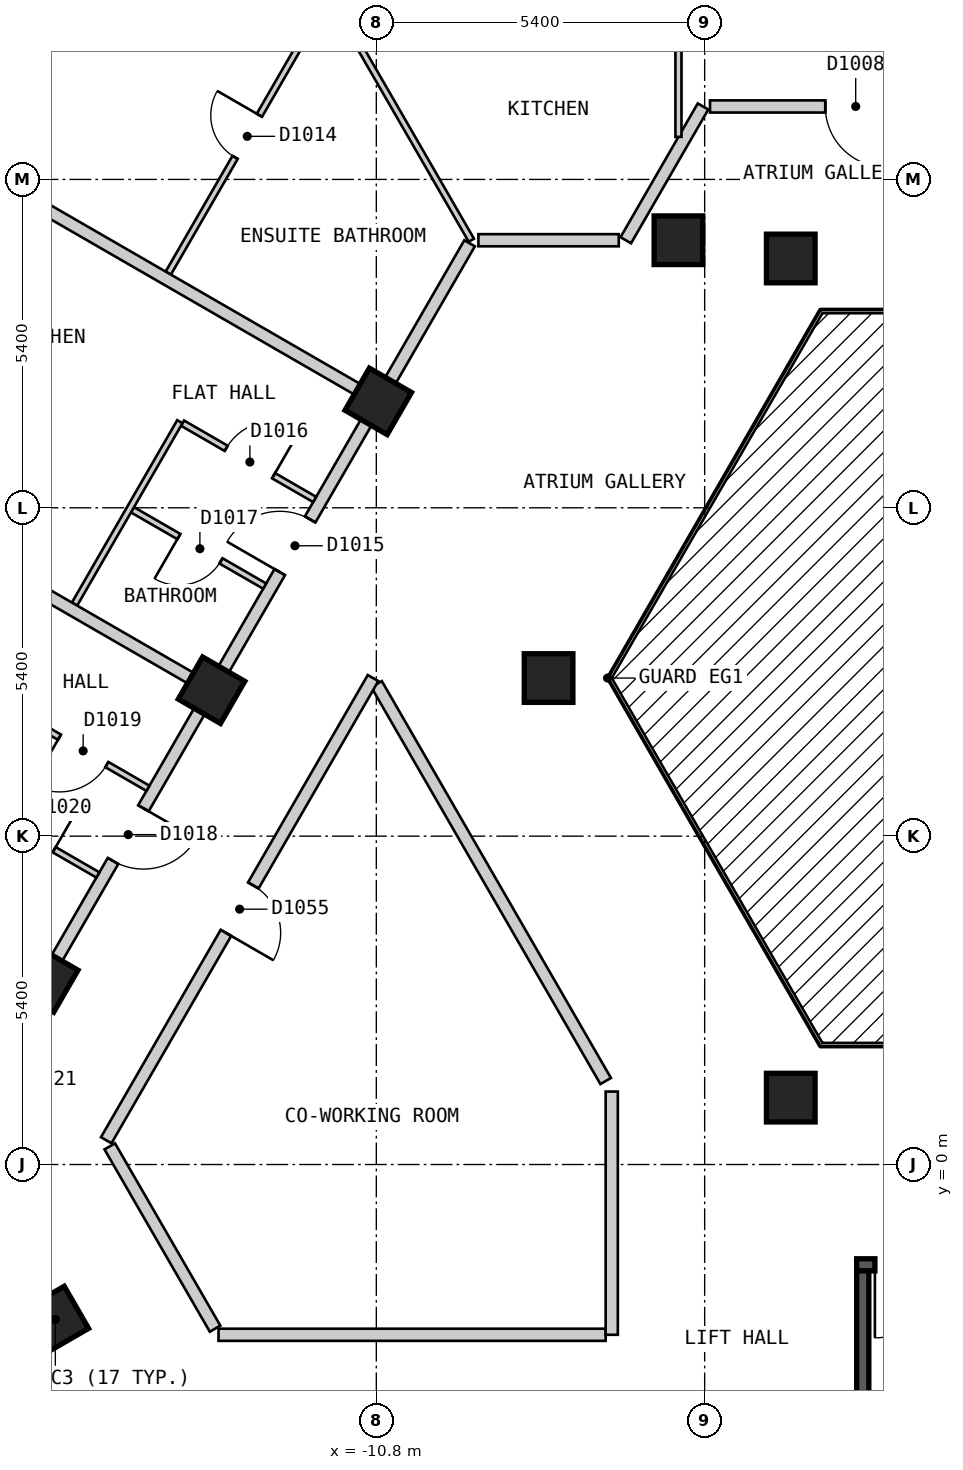
"""IFC4 building model, lengths in metres.
Left out: names, types, materials, properties, quantities, classifications, styles, units other than length and angle.
Written with IfcOpenShell. Run it as: python <this file> out.ifc"""

import sys

from ifc_helpers import new_model, si_unit, direction, frame, frame_2d, origin, origin_2d, place, context, subcontext, project, spatial, polyline, rectangle, outline, extrude, element, fill, save


model = new_model("IFC4")
c1 = context("Model", 3, precision=1e-05, world=origin(), true_north=direction((0.0, 1.0)))
c2 = subcontext(c1, "Body", "Model", "MODEL_VIEW")
j1 = project(units=[si_unit("LENGTHUNIT", "METRE"), si_unit("PLANEANGLEUNIT", "RADIAN")], contexts=[c1])
p1 = place(None, origin())
s1 = spatial("IfcSite", under=j1, at=p1, CompositionType="ELEMENT")
p2 = place(p1, origin())
s2 = spatial("IfcBuilding", under=s1, at=p2, CompositionType="ELEMENT")
p3 = place(p2, frame((0.0, 0.0, 120.6)))
s3 = spatial("IfcBuildingStorey", under=s2, at=p3, CompositionType="ELEMENT", Elevation=120.6)
for number, where, z_axis, x_axis in (
    (1, (-16.079, -2.549, 0.0), (0.0, 0.0, 1.0), (0.5, -0.866, 0.0)),
    (2, (-3.984, 14.9, 0.0), (0.0, 0.0, 1.0), (1.0, 0.0, 0.0)),
    (3, (-5.831, 15.2, 0.0), (0.0, 0.0, 1.0), (-1.0, 0.0, 0.0)),
    (4, (-10.768, 12.55, 0.0), (0.0, 0.0, 1.0), (-0.5, -0.866, 0.0)),
    (5, (-7.967, 8.0, 0.0), (0.0, 0.0, 1.0), (1.0, 0.0, 0.0)),
    (6, (-13.51, 7.8, 0.0), (0.0, 0.0, 1.0), (-0.5, -0.866, 0.0)),
    (7, (-3.984, 1.1, 0.0), (0.0, 0.0, 1.0), (1.0, 0.0, 0.0)),
    (8, (-16.253, 3.05, 0.0), (0.0, 0.0, 1.0), (-0.5, -0.866, 0.0)),
):
    element("IfcColumn", number, at=place(p3, frame(where, z_axis=z_axis, x_axis=x_axis)), inside=s3, PredefinedType="COLUMN", context=c2, shape_type="SweptSolid", body=[
        extrude(rectangle(XDim=0.8, YDim=0.8, at=origin_2d()), origin(), (0.0, 0.0, 1.0), 3.0),
    ])
p4 = place(p3, frame((-28.218, -2.025, 0.0), z_axis=(0.0, 0.0, 1.0), x_axis=(0.500017503135, -0.866015298109, 0.0)))
e9 = element("IfcWall", 9, at=p4, inside=s3, PredefinedType="SOLIDWALL", context=c2, shape_type="SweptSolid", body=[
    extrude(outline(polyline([(0.0, -0.15), (24.711, -0.15), (24.631, 0.15), (0.08, 0.15), (0.0, -0.15)])), origin(), (0.0, 0.0, 1.0), 2.7),
])
p5 = place(p4, frame((1.4, 0.0, 0.15)))
e10 = element("IfcOpeningElement", 10, at=p5, cuts=e9, PredefinedType="OPENING", context=c2, shape_type="SweptSolid", body=[
    extrude(rectangle(XDim=1.5, YDim=2.1, at=frame_2d((0.75, 1.05))), frame((0.0, 0.16, 0.0), z_axis=(0.0, -1.0, 0.0), x_axis=(1.0, 0.0, 0.0)), (0.0, 0.0, 1.0), 0.32),
])
p6 = place(p4, frame((4.316, 0.0, 0.15)))
e11 = element("IfcOpeningElement", 11, at=p6, cuts=e9, PredefinedType="OPENING", context=c2, shape_type="SweptSolid", body=[
    extrude(rectangle(XDim=1.5, YDim=2.1, at=frame_2d((0.75, 1.05))), frame((0.0, 0.16, 0.0), z_axis=(0.0, -1.0, 0.0), x_axis=(1.0, 0.0, 0.0)), (0.0, 0.0, 1.0), 0.32),
])
p7 = place(p4, frame((7.231, 0.0, 0.15)))
e12 = element("IfcOpeningElement", 12, at=p7, cuts=e9, PredefinedType="OPENING", context=c2, shape_type="SweptSolid", body=[
    extrude(rectangle(XDim=1.5, YDim=2.1, at=frame_2d((0.75, 1.05))), frame((0.0, 0.16, 0.0), z_axis=(0.0, -1.0, 0.0), x_axis=(1.0, 0.0, 0.0)), (0.0, 0.0, 1.0), 0.32),
])
p8 = place(p4, frame((10.147, 0.0, 0.15)))
e13 = element("IfcOpeningElement", 13, at=p8, cuts=e9, PredefinedType="OPENING", context=c2, shape_type="SweptSolid", body=[
    extrude(rectangle(XDim=1.5, YDim=2.1, at=frame_2d((0.75, 1.05))), frame((0.0, 0.16, 0.0), z_axis=(0.0, -1.0, 0.0), x_axis=(1.0, 0.0, 0.0)), (0.0, 0.0, 1.0), 0.32),
])
p9 = place(p4, frame((13.062, 0.0, 0.15)))
e14 = element("IfcOpeningElement", 14, at=p9, cuts=e9, PredefinedType="OPENING", context=c2, shape_type="SweptSolid", body=[
    extrude(rectangle(XDim=1.5, YDim=2.1, at=frame_2d((0.75, 1.05))), frame((0.0, 0.16, 0.0), z_axis=(0.0, -1.0, 0.0), x_axis=(1.0, 0.0, 0.0)), (0.0, 0.0, 1.0), 0.32),
])
p10 = place(p4, frame((15.977, 0.0, 0.15)))
e15 = element("IfcOpeningElement", 15, at=p10, cuts=e9, PredefinedType="OPENING", context=c2, shape_type="SweptSolid", body=[
    extrude(rectangle(XDim=1.5, YDim=2.1, at=frame_2d((0.75, 1.05))), frame((0.0, 0.16, 0.0), z_axis=(0.0, -1.0, 0.0), x_axis=(1.0, 0.0, 0.0)), (0.0, 0.0, 1.0), 0.32),
])
p11 = place(p4, frame((18.893, 0.0, 0.15)))
e16 = element("IfcOpeningElement", 16, at=p11, cuts=e9, PredefinedType="OPENING", context=c2, shape_type="SweptSolid", body=[
    extrude(rectangle(XDim=1.5, YDim=2.1, at=frame_2d((0.75, 1.05))), frame((0.0, 0.16, 0.0), z_axis=(0.0, -1.0, 0.0), x_axis=(1.0, 0.0, 0.0)), (0.0, 0.0, 1.0), 0.32),
])
p12 = place(p4, frame((21.809, 0.0, 0.15)))
e17 = element("IfcOpeningElement", 17, at=p12, cuts=e9, PredefinedType="OPENING", context=c2, shape_type="SweptSolid", body=[
    extrude(rectangle(XDim=1.5, YDim=2.1, at=frame_2d((0.75, 1.05))), frame((0.0, 0.16, 0.0), z_axis=(0.0, -1.0, 0.0), x_axis=(1.0, 0.0, 0.0)), (0.0, 0.0, 1.0), 0.32),
])
p13 = place(p3, frame((-2.9, -1.65, 0.0), z_axis=(0.0, 0.0, 1.0), x_axis=(1.0, 0.0, 0.0)))
e18 = element("IfcWall", 18, at=p13, inside=s3, PredefinedType="SOLIDWALL", context=c2, shape_type="SweptSolid", body=[
    extrude(rectangle(XDim=5.8, YDim=0.2, at=frame_2d((2.9, 0.0))), origin(), (0.0, 0.0, 1.0), 2.7),
])
p14 = place(p13, frame((0.3, 0.0, 0.0)))
e19 = element("IfcOpeningElement", 19, at=p14, cuts=e18, PredefinedType="OPENING", context=c2, shape_type="SweptSolid", body=[
    extrude(rectangle(XDim=1.2, YDim=2.1, at=frame_2d((0.6, 1.05))), frame((0.0, 0.11, 0.0), z_axis=(0.0, -1.0, 0.0), x_axis=(1.0, 0.0, 0.0)), (0.0, 0.0, 1.0), 0.22),
])
p15 = place(p3, frame((-2.8, -4.5, 0.0), z_axis=(0.0, 0.0, 1.0), x_axis=(0.0, 1.0, 0.0)))
e20 = element("IfcWall", 20, at=p15, inside=s3, PredefinedType="SOLIDWALL", context=c2, shape_type="SweptSolid", body=[
    extrude(rectangle(XDim=2.75, YDim=0.2, at=frame_2d((1.375, 0.0))), origin(), (0.0, 0.0, 1.0), 2.7),
])
p16 = place(p3, frame((-10.796, 7.9, 0.0), z_axis=(0.0, 0.0, 1.0), x_axis=(0.499954271211, -0.866051803703, 0.0)))
e21 = element("IfcWall", 21, at=p16, inside=s3, PredefinedType="PARTITIONING", context=c2, shape_type="SweptSolid", body=[
    extrude(rectangle(XDim=7.536, YDim=0.2, at=frame_2d((3.768, 0.0))), origin(), (0.0, 0.0, 1.0), 2.7),
])
p17 = place(p3, frame((-15.184, 0.299, 0.0), z_axis=(0.0, 0.0, 1.0), x_axis=(0.500149577091, -0.865939028186, 0.0)))
e22 = element("IfcWall", 22, at=p17, inside=s3, PredefinedType="PARTITIONING", context=c2, shape_type="SweptSolid", body=[
    extrude(rectangle(XDim=3.463, YDim=0.2, at=frame_2d((1.732, 0.0))), origin(), (0.0, 0.0, 1.0), 2.7),
])
p18 = place(p3, frame((-17.724, 0.299, 0.0), z_axis=(0.0, 0.0, 1.0), x_axis=(0.499910220442, -0.866077231832, 0.0)))
e23 = element("IfcWall", 23, at=p18, inside=s3, PredefinedType="PARTITIONING", context=c2, shape_type="SweptSolid", body=[
    extrude(rectangle(XDim=3.189, YDim=0.2, at=frame_2d((1.594, 0.0))), origin(), (0.0, 0.0, 1.0), 2.7),
])
p19 = place(p3, frame((-13.395, -2.8, 0.0), z_axis=(0.0, 0.0, 1.0), x_axis=(1.0, 0.0, 0.0)))
e24 = element("IfcWall", 24, at=p19, inside=s3, PredefinedType="PARTITIONING", context=c2, shape_type="SweptSolid", body=[
    extrude(rectangle(XDim=6.367, YDim=0.2, at=frame_2d((3.184, 0.0))), origin(), (0.0, 0.0, 1.0), 2.7),
])
p20 = place(p3, frame((-9.121, 15.2, 0.0), z_axis=(0.0, 0.0, 1.0), x_axis=(1.0, 0.0, 0.0)))
e25 = element("IfcWall", 25, at=p20, inside=s3, PredefinedType="PARTITIONING", context=c2, shape_type="SweptSolid", body=[
    extrude(rectangle(XDim=2.308, YDim=0.2, at=frame_2d((1.154, 0.0))), origin(), (0.0, 0.0, 1.0), 2.7),
])
p21 = place(p3, frame((-5.312, 17.4, 0.0), z_axis=(0.0, 0.0, 1.0), x_axis=(1.0, 0.0, 0.0)))
e26 = element("IfcWall", 26, at=p21, inside=s3, PredefinedType="PARTITIONING", context=c2, shape_type="SweptSolid", body=[
    extrude(rectangle(XDim=10.739, YDim=0.2, at=frame_2d((5.37, 0.0))), origin(), (0.0, 0.0, 1.0), 2.7),
])
p22 = place(p21, frame((1.896, 0.0, 0.0)))
e27 = element("IfcOpeningElement", 27, at=p22, cuts=e26, PredefinedType="OPENING", context=c2, shape_type="SweptSolid", body=[
    extrude(rectangle(XDim=1.0, YDim=2.1, at=frame_2d((0.5, 1.05))), frame((0.0, 0.11, 0.0), z_axis=(0.0, -1.0, 0.0), x_axis=(1.0, 0.0, 0.0)), (0.0, 0.0, 1.0), 0.22),
])
p23 = place(p3, frame((-15.242, 0.399, 0.0), z_axis=(0.0, 0.0, 1.0), x_axis=(0.499953615651, 0.866052182145, 0.0)))
e28 = element("IfcWall", 28, at=p23, inside=s3, PredefinedType="PARTITIONING", context=c2, shape_type="SweptSolid", body=[
    extrude(rectangle(XDim=8.777, YDim=0.2, at=frame_2d((4.388, 0.0))), origin(), (0.0, 0.0, 1.0), 2.7),
])
p24 = place(p23, frame((3.938, 0.0, 0.0)))
e29 = element("IfcOpeningElement", 29, at=p24, cuts=e28, PredefinedType="OPENING", context=c2, shape_type="SweptSolid", body=[
    extrude(rectangle(XDim=0.9, YDim=2.1, at=frame_2d((0.45, 1.05))), frame((0.0, 0.11, 0.0), z_axis=(0.0, -1.0, 0.0), x_axis=(1.0, 0.0, 0.0)), (0.0, 0.0, 1.0), 0.22),
])
p25 = place(p3, frame((-6.697, 15.2, 0.0), z_axis=(0.0, 0.0, 1.0), x_axis=(0.499963722229, 0.866046347752, 0.0)))
e30 = element("IfcWall", 30, at=p25, inside=s3, PredefinedType="PARTITIONING", context=c2, shape_type="SweptSolid", body=[
    extrude(rectangle(XDim=2.54, YDim=0.2, at=frame_2d((1.27, 0.0))), origin(), (0.0, 0.0, 1.0), 2.7),
])
p26 = place(p3, frame((-17.753, 0.45, 0.0), z_axis=(0.0, 0.0, 1.0), x_axis=(0.499990970252, 0.866030617049, 0.0)))
e31 = element("IfcWall", 31, at=p26, inside=s3, PredefinedType="PARTITIONING", context=c2, shape_type="SweptSolid", body=[
    extrude(rectangle(XDim=16.974, YDim=0.2, at=frame_2d((8.487, 0.0))), origin(), (0.0, 0.0, 1.0), 2.7),
])
p27 = place(p26, frame((10.73, 0.0, 0.0)))
e32 = element("IfcOpeningElement", 32, at=p27, cuts=e31, PredefinedType="OPENING", context=c2, shape_type="SweptSolid", body=[
    extrude(rectangle(XDim=1.0, YDim=2.1, at=frame_2d((0.5, 1.05))), frame((0.0, 0.11, 0.0), z_axis=(0.0, -1.0, 0.0), x_axis=(1.0, 0.0, 0.0)), (0.0, 0.0, 1.0), 0.22),
])
p28 = place(p26, frame((5.245, 0.0, 0.0)))
e33 = element("IfcOpeningElement", 33, at=p28, cuts=e31, PredefinedType="OPENING", context=c2, shape_type="SweptSolid", body=[
    extrude(rectangle(XDim=1.0, YDim=2.1, at=frame_2d((0.5, 1.05))), frame((0.0, 0.11, 0.0), z_axis=(0.0, -1.0, 0.0), x_axis=(1.0, 0.0, 0.0)), (0.0, 0.0, 1.0), 0.22),
])
p29 = place(p26, frame((0.594, 0.0, 0.0)))
e34 = element("IfcOpeningElement", 34, at=p29, cuts=e31, PredefinedType="OPENING", context=c2, shape_type="SweptSolid", body=[
    extrude(rectangle(XDim=1.0, YDim=2.1, at=frame_2d((0.5, 1.05))), frame((0.0, 0.11, 0.0), z_axis=(0.0, -1.0, 0.0), x_axis=(1.0, 0.0, 0.0)), (0.0, 0.0, 1.0), 0.22),
])
p30 = place(p3, frame((-6.928, -2.8, 0.0), z_axis=(0.0, 0.0, 1.0), x_axis=(0.0, 1.0, 0.0)))
e35 = element("IfcWall", 35, at=p30, inside=s3, PredefinedType="PARTITIONING", context=c2, shape_type="SweptSolid", body=[
    extrude(rectangle(XDim=4.0, YDim=0.2, at=frame_2d((2.0, 0.0))), origin(), (0.0, 0.0, 1.0), 2.7),
])
p31 = place(p3, frame((-14.37, 24.09, 0.0), z_axis=(0.0, 0.0, 1.0), x_axis=(0.50002438799, -0.866011322914, 0.0)))
e36 = element("IfcWall", 36, at=p31, inside=s3, PredefinedType="PARTITIONING", context=c2, shape_type="SweptSolid", body=[
    extrude(rectangle(XDim=10.266, YDim=0.1, at=frame_2d((5.133, 0.0))), origin(), (0.0, 0.0, 1.0), 2.7),
])
p32 = place(p31, frame((2.347, 0.0, 0.0)))
e37 = element("IfcOpeningElement", 37, at=p32, cuts=e36, PredefinedType="OPENING", context=c2, shape_type="SweptSolid", body=[
    extrude(rectangle(XDim=0.9, YDim=2.1, at=frame_2d((0.45, 1.05))), frame((0.0, 0.06, 0.0), z_axis=(0.0, -1.0, 0.0), x_axis=(1.0, 0.0, 0.0)), (0.0, 0.0, 1.0), 0.12),
])
p33 = place(p3, frame((-17.553, 6.017, 0.0), z_axis=(0.0, 0.0, 1.0), x_axis=(0.866038211682, -0.499977815414, 0.0)))
e38 = element("IfcWall", 38, at=p33, inside=s3, PredefinedType="PARTITIONING", context=c2, shape_type="SweptSolid", body=[
    extrude(rectangle(XDim=2.51, YDim=0.1, at=frame_2d((1.255, 0.0))), origin(), (0.0, 0.0, 1.0), 2.7),
])
p34 = place(p33, frame((0.88, 0.0, 0.0)))
e39 = element("IfcOpeningElement", 39, at=p34, cuts=e38, PredefinedType="OPENING", context=c2, shape_type="SweptSolid", body=[
    extrude(rectangle(XDim=0.8, YDim=2.1, at=frame_2d((0.4, 1.05))), frame((0.0, 0.06, 0.0), z_axis=(0.0, -1.0, 0.0), x_axis=(1.0, 0.0, 0.0)), (0.0, 0.0, 1.0), 0.12),
])
p35 = place(p3, frame((-16.729, 7.442, 0.0), z_axis=(0.0, 0.0, 1.0), x_axis=(0.865983051302, -0.500073349477, 0.0)))
e40 = element("IfcWall", 40, at=p35, inside=s3, PredefinedType="PARTITIONING", context=c2, shape_type="SweptSolid", body=[
    extrude(rectangle(XDim=2.509, YDim=0.1, at=frame_2d((1.255, 0.0))), origin(), (0.0, 0.0, 1.0), 2.7),
])
p36 = place(p35, frame((0.829, 0.0, 0.0)))
e41 = element("IfcOpeningElement", 41, at=p36, cuts=e40, PredefinedType="OPENING", context=c2, shape_type="SweptSolid", body=[
    extrude(rectangle(XDim=0.9, YDim=2.1, at=frame_2d((0.45, 1.05))), frame((0.0, 0.06, 0.0), z_axis=(0.0, -1.0, 0.0), x_axis=(1.0, 0.0, 0.0)), (0.0, 0.0, 1.0), 0.12),
])
p37 = place(p3, frame((-13.987, 12.192, 0.0), z_axis=(0.0, 0.0, 1.0), x_axis=(0.865983051302, -0.500073349477, 0.0)))
e42 = element("IfcWall", 42, at=p37, inside=s3, PredefinedType="PARTITIONING", context=c2, shape_type="SweptSolid", body=[
    extrude(rectangle(XDim=2.509, YDim=0.1, at=frame_2d((1.255, 0.0))), origin(), (0.0, 0.0, 1.0), 2.7),
])
p38 = place(p37, frame((0.829, 0.0, 0.0)))
e43 = element("IfcOpeningElement", 43, at=p38, cuts=e42, PredefinedType="OPENING", context=c2, shape_type="SweptSolid", body=[
    extrude(rectangle(XDim=0.9, YDim=2.1, at=frame_2d((0.45, 1.05))), frame((0.0, 0.06, 0.0), z_axis=(0.0, -1.0, 0.0), x_axis=(1.0, 0.0, 0.0)), (0.0, 0.0, 1.0), 0.12),
])
p39 = place(p3, frame((-14.81, 10.767, 0.0), z_axis=(0.0, 0.0, 1.0), x_axis=(0.866038211682, -0.499977815414, 0.0)))
e44 = element("IfcWall", 44, at=p39, inside=s3, PredefinedType="PARTITIONING", context=c2, shape_type="SweptSolid", body=[
    extrude(rectangle(XDim=2.51, YDim=0.1, at=frame_2d((1.255, 0.0))), origin(), (0.0, 0.0, 1.0), 2.7),
])
p40 = place(p39, frame((0.88, 0.0, 0.0)))
e45 = element("IfcOpeningElement", 45, at=p40, cuts=e44, PredefinedType="OPENING", context=c2, shape_type="SweptSolid", body=[
    extrude(rectangle(XDim=0.8, YDim=2.1, at=frame_2d((0.4, 1.05))), frame((0.0, 0.06, 0.0), z_axis=(0.0, -1.0, 0.0), x_axis=(1.0, 0.0, 0.0)), (0.0, 0.0, 1.0), 0.12),
])
p41 = place(p3, frame((-15.763, 9.217, 0.0), z_axis=(0.0, 0.0, 1.0), x_axis=(0.500096714907, 0.865969558206, 0.0)))
e46 = element("IfcWall", 46, at=p41, inside=s3, PredefinedType="PARTITIONING", context=c2, shape_type="SweptSolid", body=[
    extrude(rectangle(XDim=3.463, YDim=0.1, at=frame_2d((1.731, 0.0))), origin(), (0.0, 0.0, 1.0), 2.7),
])
p42 = place(p3, frame((-14.222, 14.659, 0.0), z_axis=(0.0, 0.0, 1.0), x_axis=(0.500053212623, 0.865994679283, 0.0)))
e47 = element("IfcWall", 47, at=p42, inside=s3, PredefinedType="PARTITIONING", context=c2, shape_type="SweptSolid", body=[
    extrude(rectangle(XDim=5.239, YDim=0.1, at=frame_2d((2.62, 0.0))), origin(), (0.0, 0.0, 1.0), 2.7),
])
p43 = place(p42, frame((2.198, 0.0, 0.0)))
e48 = element("IfcOpeningElement", 48, at=p43, cuts=e47, PredefinedType="OPENING", context=c2, shape_type="SweptSolid", body=[
    extrude(rectangle(XDim=0.8, YDim=2.1, at=frame_2d((0.4, 1.05))), frame((0.0, 0.06, 0.0), z_axis=(0.0, -1.0, 0.0), x_axis=(1.0, 0.0, 0.0)), (0.0, 0.0, 1.0), 0.12),
])
p44 = place(p3, frame((-5.831, 16.9, 0.0), z_axis=(0.0, 0.0, 1.0), x_axis=(0.0, 1.0, 0.0)))
e49 = element("IfcWall", 49, at=p44, inside=s3, PredefinedType="PARTITIONING", context=c2, shape_type="SweptSolid", body=[
    extrude(rectangle(XDim=4.546, YDim=0.1, at=frame_2d((2.273, 0.0))), origin(), (0.0, 0.0, 1.0), 2.7),
])
p45 = place(p44, frame((1.723, 0.0, 0.0)))
e50 = element("IfcOpeningElement", 50, at=p45, cuts=e49, PredefinedType="OPENING", context=c2, shape_type="SweptSolid", body=[
    extrude(rectangle(XDim=0.9, YDim=2.1, at=frame_2d((0.45, 1.05))), frame((0.0, 0.06, 0.0), z_axis=(0.0, -1.0, 0.0), x_axis=(1.0, 0.0, 0.0)), (0.0, 0.0, 1.0), 0.12),
])
p46 = place(p3, frame((-17.956, -3.783, 0.0), z_axis=(0.0, 0.0, 1.0), x_axis=(0.964815336827, -0.2629284424, 0.0)))
e51 = element("IfcWall", 51, at=p46, inside=s3, PredefinedType="PARTITIONING", context=c2, shape_type="SweptSolid", body=[
    extrude(rectangle(XDim=2.514, YDim=0.2, at=frame_2d((1.257, 0.0))), origin(), (0.0, 0.0, 1.0), 2.7),
])
p47 = place(p3, frame((-22.257, 12.85, 0.0), z_axis=(0.0, 0.0, 1.0), x_axis=(0.866047370643, -0.499961950354, 0.0)))
e52 = element("IfcWall", 52, at=p47, inside=s3, PredefinedType="PARTITIONING", context=c2, shape_type="SweptSolid", body=[
    extrude(rectangle(XDim=10.001, YDim=0.2, at=frame_2d((5.0, 0.0))), origin(), (0.0, 0.0, 1.0), 2.7),
])
p48 = place(p3, frame((-19.514, 17.599, 0.0), z_axis=(0.0, 0.0, 1.0), x_axis=(0.866059142644, -0.499941558027, 0.0)))
e53 = element("IfcWall", 53, at=p48, inside=s3, PredefinedType="PARTITIONING", context=c2, shape_type="SweptSolid", body=[
    extrude(rectangle(XDim=9.999, YDim=0.2, at=frame_2d((5.0, 0.0))), origin(), (0.0, 0.0, 1.0), 2.7),
])
p49 = place(p3, frame((-24.826, -7.599, 0.0), z_axis=(0.0, 0.0, 1.0), x_axis=(0.86599621094, 0.500050560081, 0.0)))
e54 = element("IfcWall", 54, at=p49, inside=s3, PredefinedType="PARTITIONING", context=c2, shape_type="SweptSolid", body=[
    extrude(rectangle(XDim=10.069, YDim=0.2, at=frame_2d((5.035, 0.0))), origin(), (0.0, 0.0, 1.0), 2.7),
])
p50 = place(p14, origin())
e55 = element("IfcDoor", 55, at=p50, inside=s3, OperationType="SINGLE_SWING_LEFT", PredefinedType="DOOR", context=c2, shape_type="SweptSolid", body=[
    extrude(rectangle(XDim=1.2, YDim=2.1, at=frame_2d((0.6, 1.05))), frame((0.0, 0.025, 0.0), z_axis=(0.0, -1.0, 0.0), x_axis=(1.0, 0.0, 0.0)), (0.0, 0.0, 1.0), 0.05),
])
fill(e19, e55)
p51 = place(p22, origin())
e56 = element("IfcDoor", 56, at=p51, inside=s3, OperationType="SINGLE_SWING_RIGHT", PredefinedType="DOOR", context=c2, shape_type="SweptSolid", body=[
    extrude(rectangle(XDim=1.0, YDim=2.1, at=frame_2d((0.5, 1.05))), frame((0.0, 0.025, 0.0), z_axis=(0.0, -1.0, 0.0), x_axis=(1.0, 0.0, 0.0)), (0.0, 0.0, 1.0), 0.05),
])
fill(e27, e56)
p52 = place(p43, origin())
e57 = element("IfcDoor", 57, at=p52, inside=s3, OperationType="SINGLE_SWING_RIGHT", PredefinedType="DOOR", context=c2, shape_type="SweptSolid", body=[
    extrude(rectangle(XDim=0.8, YDim=2.1, at=frame_2d((0.4, 1.05))), frame((0.0, 0.025, 0.0), z_axis=(0.0, -1.0, 0.0), x_axis=(1.0, 0.0, 0.0)), (0.0, 0.0, 1.0), 0.05),
])
fill(e48, e57)
p53 = place(p27, origin())
e58 = element("IfcDoor", 58, at=p53, inside=s3, OperationType="SINGLE_SWING_LEFT", PredefinedType="DOOR", context=c2, shape_type="SweptSolid", body=[
    extrude(rectangle(XDim=1.0, YDim=2.1, at=frame_2d((0.5, 1.05))), frame((0.0, 0.025, 0.0), z_axis=(0.0, -1.0, 0.0), x_axis=(1.0, 0.0, 0.0)), (0.0, 0.0, 1.0), 0.05),
])
fill(e32, e58)
p54 = place(p38, origin())
e59 = element("IfcDoor", 59, at=p54, inside=s3, OperationType="SINGLE_SWING_RIGHT", PredefinedType="DOOR", context=c2, shape_type="SweptSolid", body=[
    extrude(rectangle(XDim=0.9, YDim=2.1, at=frame_2d((0.45, 1.05))), frame((0.0, 0.025, 0.0), z_axis=(0.0, -1.0, 0.0), x_axis=(1.0, 0.0, 0.0)), (0.0, 0.0, 1.0), 0.05),
])
fill(e43, e59)
p55 = place(p40, origin())
e60 = element("IfcDoor", 60, at=p55, inside=s3, OperationType="SINGLE_SWING_LEFT", PredefinedType="DOOR", context=c2, shape_type="SweptSolid", body=[
    extrude(rectangle(XDim=0.8, YDim=2.1, at=frame_2d((0.4, 1.05))), frame((0.0, 0.025, 0.0), z_axis=(0.0, -1.0, 0.0), x_axis=(1.0, 0.0, 0.0)), (0.0, 0.0, 1.0), 0.05),
])
fill(e45, e60)
p56 = place(p28, origin())
e61 = element("IfcDoor", 61, at=p56, inside=s3, OperationType="SINGLE_SWING_RIGHT", PredefinedType="DOOR", context=c2, shape_type="SweptSolid", body=[
    extrude(rectangle(XDim=1.0, YDim=2.1, at=frame_2d((0.5, 1.05))), frame((0.0, 0.025, 0.0), z_axis=(0.0, -1.0, 0.0), x_axis=(1.0, 0.0, 0.0)), (0.0, 0.0, 1.0), 0.05),
])
fill(e33, e61)
p57 = place(p36, origin())
e62 = element("IfcDoor", 62, at=p57, inside=s3, OperationType="SINGLE_SWING_LEFT", PredefinedType="DOOR", context=c2, shape_type="SweptSolid", body=[
    extrude(rectangle(XDim=0.9, YDim=2.1, at=frame_2d((0.45, 1.05))), frame((0.0, 0.025, 0.0), z_axis=(0.0, -1.0, 0.0), x_axis=(1.0, 0.0, 0.0)), (0.0, 0.0, 1.0), 0.05),
])
fill(e41, e62)
p58 = place(p34, origin())
e63 = element("IfcDoor", 63, at=p58, inside=s3, OperationType="SINGLE_SWING_RIGHT", PredefinedType="DOOR", context=c2, shape_type="SweptSolid", body=[
    extrude(rectangle(XDim=0.8, YDim=2.1, at=frame_2d((0.4, 1.05))), frame((0.0, 0.025, 0.0), z_axis=(0.0, -1.0, 0.0), x_axis=(1.0, 0.0, 0.0)), (0.0, 0.0, 1.0), 0.05),
])
fill(e39, e63)
p59 = place(p24, origin())
e64 = element("IfcDoor", 64, at=p59, inside=s3, OperationType="SINGLE_SWING_LEFT", PredefinedType="DOOR", context=c2, shape_type="SweptSolid", body=[
    extrude(rectangle(XDim=0.9, YDim=2.1, at=frame_2d((0.45, 1.05))), frame((0.0, 0.025, 0.0), z_axis=(0.0, -1.0, 0.0), x_axis=(1.0, 0.0, 0.0)), (0.0, 0.0, 1.0), 0.05),
])
fill(e29, e64)
save(model, sys.argv[1])
